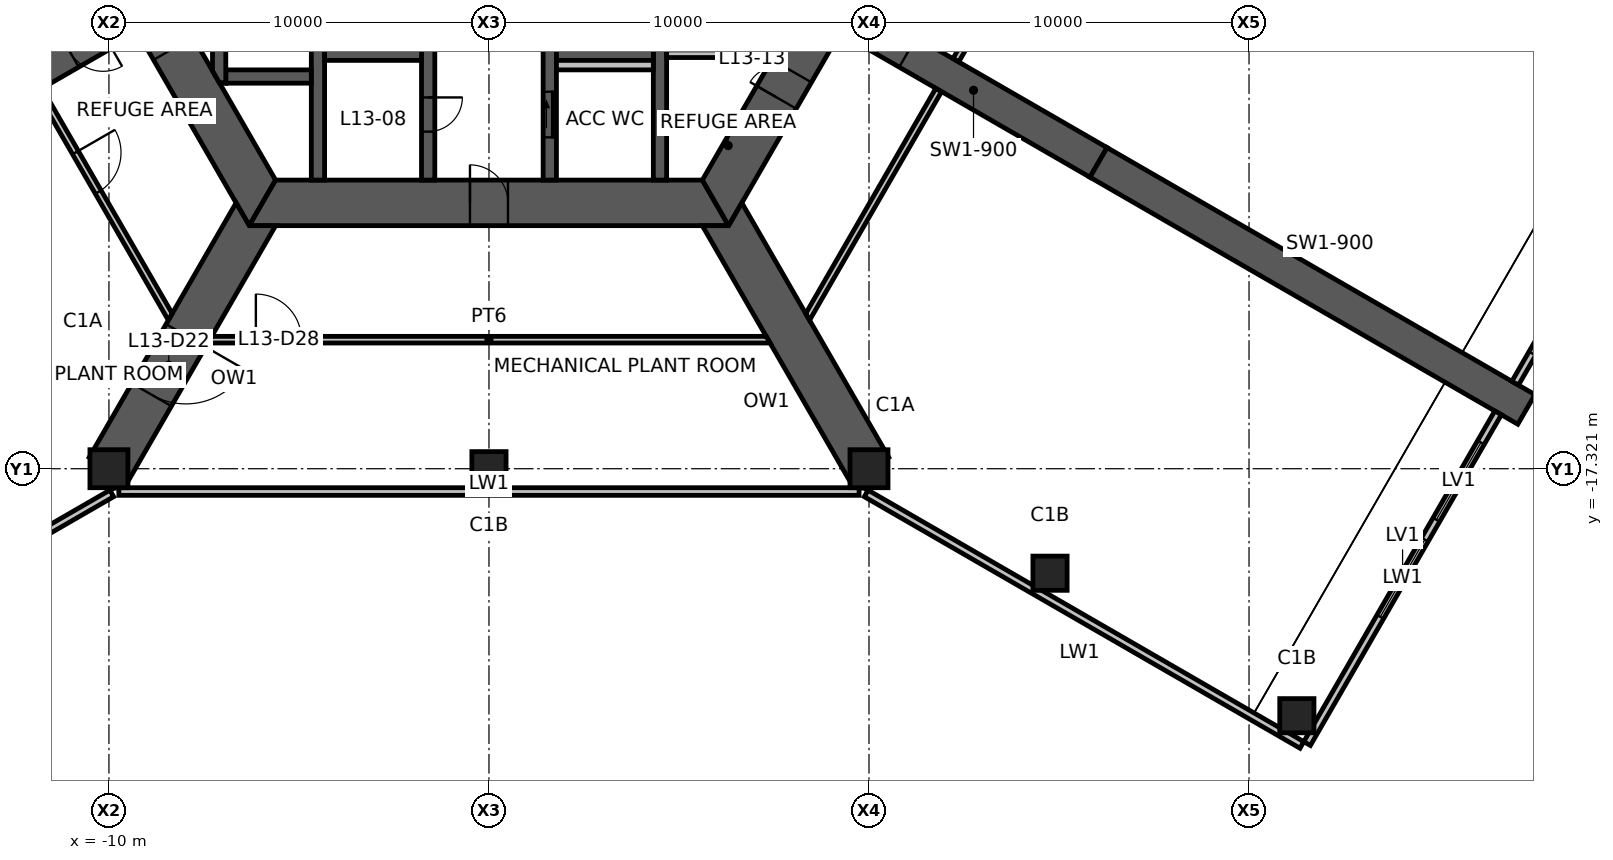
"""IFC4 building model, lengths in metres.
Left out: names, types, materials, properties, quantities, classifications, styles, units other than length and angle.
Written with IfcOpenShell. Run it as: python <this file> out.ifc"""

import sys

from ifc_helpers import new_model, si_unit, direction, frame, frame_2d, origin, origin_2d, place, context, subcontext, project, spatial, polyline, rectangle, hollow_rectangle, outline, extrude, element, fill, save


model = new_model("IFC4")
c1 = context("Model", 3, precision=1e-05, world=origin(), true_north=direction((0.0, 1.0)))
c2 = subcontext(c1, "Body", "Model", "MODEL_VIEW")
j1 = project(units=[si_unit("LENGTHUNIT", "METRE"), si_unit("PLANEANGLEUNIT", "RADIAN")], contexts=[c1])
p1 = place(None, origin())
s1 = spatial("IfcSite", under=j1, at=p1, CompositionType="ELEMENT")
p2 = place(p1, origin())
s2 = spatial("IfcBuilding", under=s1, at=p2, CompositionType="ELEMENT")
p3 = place(p2, frame((0.0, 0.0, 52.0)))
s3 = spatial("IfcBuildingStorey", under=s2, at=p3, CompositionType="ELEMENT", Elevation=52.0)
for number, where, z_axis, x_axis in (
    (1, (-10.0, -17.321, 0.0), (0.0, 0.0, 1.0), (1.0, 0.0, 0.0)),
    (2, (10.0, -17.321, 0.0), (0.0, 0.0, 1.0), (1.0, 0.0, 0.0)),
):
    element("IfcColumn", number, at=place(p3, frame(where, z_axis=z_axis, x_axis=x_axis)), inside=s3, PredefinedType="COLUMN", context=c2, shape_type="SweptSolid", body=[
        extrude(hollow_rectangle(XDim=1.0, YDim=1.0, WallThickness=0.06, at=origin_2d()), origin(), (0.0, 0.0, 1.0), 5.0),
    ])
for number, where, z_axis, x_axis in (
    (3, (0.0, -17.321, 0.0), (0.0, 0.0, 1.0), (1.0, 0.0, 0.0)),
    (4, (14.763, -20.071, 0.0), (0.0, 0.0, 1.0), (1.0, 0.0, 0.0)),
    (5, (21.258, -23.821, 0.0), (0.0, 0.0, 1.0), (1.0, 0.0, 0.0)),
):
    element("IfcColumn", number, at=place(p3, frame(where, z_axis=z_axis, x_axis=x_axis)), inside=s3, PredefinedType="COLUMN", context=c2, shape_type="SweptSolid", body=[
        extrude(hollow_rectangle(XDim=0.9, YDim=0.9, WallThickness=0.05, at=origin_2d()), origin(), (0.0, 0.0, 1.0), 5.0),
    ])
p4 = place(p3, frame((-11.922, 0.0, 0.0), z_axis=(0.0, 0.0, 1.0), x_axis=(0.500004296715, -0.866022923061, 0.0)))
e6 = element("IfcWall", 6, at=p4, inside=s3, PredefinedType="SHEAR", context=c2, shape_type="SweptSolid", body=[
    extrude(outline(polyline([(-0.346, -0.6), (6.431, -0.6), (7.231, -0.6), (12.269, -0.6), (11.576, 0.6), (7.231, 0.6), (6.431, 0.6), (0.346, 0.6), (-0.346, -0.6)])), origin(), (0.0, 0.0, 1.0), 5.0),
])
p5 = place(p4, frame((6.431, 0.0, 0.0)))
e7 = element("IfcOpeningElement", 7, at=p5, cuts=e6, PredefinedType="OPENING", context=c2, shape_type="SweptSolid", body=[
    extrude(rectangle(XDim=0.8, YDim=2.1, at=frame_2d((0.4, 1.05))), frame((0.0, 0.61, 0.0), z_axis=(0.0, -1.0, 0.0), x_axis=(1.0, 0.0, 0.0)), (0.0, 0.0, 1.0), 1.22),
])
p6 = place(p3, frame((-5.961, -10.325, 0.0), z_axis=(0.0, 0.0, 1.0), x_axis=(1.0, 0.0, 0.0)))
e8 = element("IfcWall", 8, at=p6, inside=s3, PredefinedType="SHEAR", context=c2, shape_type="SweptSolid", body=[
    extrude(outline(polyline([(-0.346, -0.6), (5.461, -0.6), (6.461, -0.6), (12.269, -0.6), (11.576, 0.6), (6.461, 0.6), (5.461, 0.6), (0.346, 0.6), (-0.346, -0.6)])), origin(), (0.0, 0.0, 1.0), 5.0),
])
p7 = place(p6, frame((5.461, 0.0, 0.0)))
e9 = element("IfcOpeningElement", 9, at=p7, cuts=e8, PredefinedType="OPENING", context=c2, shape_type="SweptSolid", body=[
    extrude(rectangle(XDim=1.0, YDim=2.1, at=frame_2d((0.5, 1.05))), frame((0.0, 0.61, 0.0), z_axis=(0.0, -1.0, 0.0), x_axis=(1.0, 0.0, 0.0)), (0.0, 0.0, 1.0), 1.22),
])
p8 = place(p3, frame((5.961, -10.325, 0.0), z_axis=(0.0, 0.0, 1.0), x_axis=(0.500004296715, 0.866022923061, 0.0)))
e10 = element("IfcWall", 10, at=p8, inside=s3, PredefinedType="SHEAR", context=c2, shape_type="SweptSolid", body=[
    extrude(outline(polyline([(-0.346, -0.6), (3.208, -0.6), (4.009, -0.6), (12.269, -0.6), (11.576, 0.6), (4.009, 0.6), (3.208, 0.6), (0.346, 0.6), (-0.346, -0.6)])), origin(), (0.0, 0.0, 1.0), 5.0),
])
p9 = place(p8, frame((3.208, 0.0, 0.0)))
e11 = element("IfcOpeningElement", 11, at=p9, cuts=e10, PredefinedType="OPENING", context=c2, shape_type="SweptSolid", body=[
    extrude(rectangle(XDim=0.8, YDim=2.1, at=frame_2d((0.4, 1.05))), frame((0.0, 0.61, 0.0), z_axis=(0.0, -1.0, 0.0), x_axis=(1.0, 0.0, 0.0)), (0.0, 0.0, 1.0), 1.22),
])
p10 = place(p3, frame((-9.461, -5.462, 0.0), z_axis=(0.0, 0.0, 1.0), x_axis=(-0.866019116917, -0.500010889016, 0.0)))
e12 = element("IfcWall", 12, at=p10, inside=s3, PredefinedType="SHEAR", context=c2, shape_type="SweptSolid", body=[
    extrude(rectangle(XDim=7.595, YDim=0.9, at=frame_2d((3.798, 0.0))), origin(), (0.0, 0.0, 1.0), 5.0),
])
p11 = place(p10, frame((0.8, 0.0, 0.0)))
e13 = element("IfcOpeningElement", 13, at=p11, cuts=e12, PredefinedType="OPENING", context=c2, shape_type="SweptSolid", body=[
    extrude(rectangle(XDim=1.0, YDim=2.1, at=frame_2d((0.5, 1.05))), frame((0.0, 0.46, 0.0), z_axis=(0.0, -1.0, 0.0), x_axis=(1.0, 0.0, 0.0)), (0.0, 0.0, 1.0), 0.92),
])
p12 = place(p3, frame((9.461, -5.462, 0.0), z_axis=(0.0, 0.0, 1.0), x_axis=(0.866019116917, -0.500010889016, 0.0)))
e14 = element("IfcWall", 14, at=p12, inside=s3, PredefinedType="SHEAR", context=c2, shape_type="SweptSolid", body=[
    extrude(rectangle(XDim=7.595, YDim=0.9, at=frame_2d((3.798, 0.0))), origin(), (0.0, 0.0, 1.0), 5.0),
])
p13 = place(p12, frame((0.8, 0.0, 0.0)))
e15 = element("IfcOpeningElement", 15, at=p13, cuts=e14, PredefinedType="OPENING", context=c2, shape_type="SweptSolid", body=[
    extrude(rectangle(XDim=1.0, YDim=2.1, at=frame_2d((0.5, 1.05))), frame((0.0, 0.46, 0.0), z_axis=(0.0, -1.0, 0.0), x_axis=(1.0, 0.0, 0.0)), (0.0, 0.0, 1.0), 0.92),
])
p14 = place(p3, frame((16.039, -9.26, 0.0), z_axis=(0.0, 0.0, 1.0), x_axis=(0.866024837091, -0.50000098154, 0.0)))
e16 = element("IfcWall", 16, at=p14, inside=s3, PredefinedType="SHEAR", context=c2, shape_type="SweptSolid", body=[
    extrude(rectangle(XDim=13.0, YDim=0.9, at=frame_2d((6.5, 0.0))), origin(), (0.0, 0.0, 1.0), 5.0),
])
p15 = place(p3, frame((-6.308, -10.925, -1.15), z_axis=(0.0, 0.0, 1.0), x_axis=(-0.499993363642, -0.866029235253, 0.0)))
e17 = element("IfcWall", 17, at=p15, inside=s3, PredefinedType="SHEAR", context=c2, shape_type="SweptSolid", body=[
    extrude(outline(polyline([(-0.346, -0.6), (3.338, -0.6), (5.138, -0.6), (7.385, -0.6), (7.385, 0.6), (5.138, 0.6), (3.338, 0.6), (-0.346, 0.6), (0.0, 0.0), (-0.346, -0.6)])), origin(), (0.0, 0.0, 1.0), 6.15),
])
p16 = place(p15, frame((3.338, 0.0, 1.15)))
e18 = element("IfcOpeningElement", 18, at=p16, cuts=e17, PredefinedType="OPENING", context=c2, shape_type="SweptSolid", body=[
    extrude(rectangle(XDim=1.8, YDim=2.4, at=frame_2d((0.9, 1.2))), frame((0.0, 0.61, 0.0), z_axis=(0.0, -1.0, 0.0), x_axis=(1.0, 0.0, 0.0)), (0.0, 0.0, 1.0), 1.22),
])
p17 = place(p3, frame((6.308, -10.925, -1.15), z_axis=(0.0, 0.0, 1.0), x_axis=(0.499993363642, -0.866029235253, 0.0)))
e19 = element("IfcWall", 19, at=p17, inside=s3, PredefinedType="SHEAR", context=c2, shape_type="SweptSolid", body=[
    extrude(outline(polyline([(-0.346, -0.6), (7.385, -0.6), (7.385, 0.6), (-0.346, 0.6), (0.0, 0.0), (-0.346, -0.6)])), origin(), (0.0, 0.0, 1.0), 6.15),
])
p18 = place(p3, frame((-21.391, -24.59, 0.0), z_axis=(0.0, 0.0, 1.0), x_axis=(0.86602620781, 0.499998607384, 0.0)))
e20 = element("IfcWall", 20, at=p18, inside=s3, PredefinedType="ELEMENTEDWALL", context=c2, shape_type="SweptSolid", body=[
    extrude(rectangle(XDim=13.239, YDim=0.2, at=frame_2d((6.62, 0.0))), origin(), (0.0, 0.0, 1.0), 5.0),
])
p19 = place(p3, frame((-9.739, -17.92, 0.0), z_axis=(0.0, 0.0, 1.0), x_axis=(1.0, 0.0, 0.0)))
e21 = element("IfcWall", 21, at=p19, inside=s3, PredefinedType="ELEMENTEDWALL", context=c2, shape_type="SweptSolid", body=[
    extrude(rectangle(XDim=19.479, YDim=0.2, at=frame_2d((9.739, 0.0))), origin(), (0.0, 0.0, 1.0), 5.0),
])
p20 = place(p3, frame((9.926, -17.97, 0.0), z_axis=(0.0, 0.0, 1.0), x_axis=(0.86602620781, -0.499998607384, 0.0)))
e22 = element("IfcWall", 22, at=p20, inside=s3, PredefinedType="ELEMENTEDWALL", context=c2, shape_type="SweptSolid", body=[
    extrude(rectangle(XDim=13.239, YDim=0.2, at=frame_2d((6.62, 0.0))), origin(), (0.0, 0.0, 1.0), 5.0),
])
p21 = place(p3, frame((21.528, -24.553, 0.0), z_axis=(0.0, 0.0, 1.0), x_axis=(0.500008433718, 0.866020534521, 0.0)))
e23 = element("IfcWall", 23, at=p21, inside=s3, PredefinedType="ELEMENTEDWALL", context=c2, shape_type="SweptSolid", body=[
    extrude(rectangle(XDim=10.05, YDim=0.2, at=frame_2d((5.025, 0.0))), origin(), (0.0, 0.0, 1.0), 5.0),
])
p22 = place(p21, frame((3.85, 0.0, 0.6)))
e24 = element("IfcOpeningElement", 24, at=p22, cuts=e23, PredefinedType="OPENING", context=c2, shape_type="SweptSolid", body=[
    extrude(rectangle(XDim=2.35, YDim=3.6, at=frame_2d((1.175, 1.8))), frame((0.0, 0.11, 0.0), z_axis=(0.0, -1.0, 0.0), x_axis=(1.0, 0.0, 0.0)), (0.0, 0.0, 1.0), 0.22),
])
p23 = place(p21, frame((6.8, 0.0, 0.6)))
e25 = element("IfcOpeningElement", 25, at=p23, cuts=e23, PredefinedType="OPENING", context=c2, shape_type="SweptSolid", body=[
    extrude(rectangle(XDim=2.35, YDim=3.6, at=frame_2d((1.175, 1.8))), frame((0.0, 0.11, 0.0), z_axis=(0.0, -1.0, 0.0), x_axis=(1.0, 0.0, 0.0)), (0.0, 0.0, 1.0), 0.22),
])
p24 = place(p3, frame((27.003, -15.071, 0.0), z_axis=(0.0, 0.0, 1.0), x_axis=(0.499990214365, 0.86603105345, 0.0)))
e26 = element("IfcWall", 26, at=p24, inside=s3, PredefinedType="ELEMENTEDWALL", context=c2, shape_type="SweptSolid", body=[
    extrude(rectangle(XDim=10.05, YDim=0.2, at=frame_2d((5.025, 0.0))), origin(), (0.0, 0.0, 1.0), 5.0),
])
p25 = place(p24, frame((0.9, 0.0, 0.6)))
e27 = element("IfcOpeningElement", 27, at=p25, cuts=e26, PredefinedType="OPENING", context=c2, shape_type="SweptSolid", body=[
    extrude(rectangle(XDim=2.35, YDim=3.6, at=frame_2d((1.175, 1.8))), frame((0.0, 0.11, 0.0), z_axis=(0.0, -1.0, 0.0), x_axis=(1.0, 0.0, 0.0)), (0.0, 0.0, 1.0), 0.22),
])
p26 = place(p24, frame((3.85, 0.0, 0.6)))
e28 = element("IfcOpeningElement", 28, at=p26, cuts=e26, PredefinedType="OPENING", context=c2, shape_type="SweptSolid", body=[
    extrude(rectangle(XDim=2.35, YDim=3.6, at=frame_2d((1.175, 1.8))), frame((0.0, 0.11, 0.0), z_axis=(0.0, -1.0, 0.0), x_axis=(1.0, 0.0, 0.0)), (0.0, 0.0, 1.0), 0.22),
])
p27 = place(p3, frame((-1.6, -3.775, 0.0), z_axis=(0.0, 0.0, 1.0), x_axis=(0.0, -1.0, 0.0)))
e29 = element("IfcWall", 29, at=p27, inside=s3, PredefinedType="SHEAR", context=c2, shape_type="SweptSolid", body=[
    extrude(rectangle(XDim=5.95, YDim=0.35, at=frame_2d((2.975, 0.0))), origin(), (0.0, 0.0, 1.0), 5.0),
])
p28 = place(p27, frame((3.775, 0.0, 0.0)))
e30 = element("IfcOpeningElement", 30, at=p28, cuts=e29, PredefinedType="OPENING", context=c2, shape_type="SweptSolid", body=[
    extrude(rectangle(XDim=0.9, YDim=2.1, at=frame_2d((0.45, 1.05))), frame((0.0, 0.185, 0.0), z_axis=(0.0, -1.0, 0.0), x_axis=(1.0, 0.0, 0.0)), (0.0, 0.0, 1.0), 0.37),
])
p29 = place(p3, frame((1.6, -3.775, 0.0), z_axis=(0.0, 0.0, 1.0), x_axis=(0.0, -1.0, 0.0)))
e31 = element("IfcWall", 31, at=p29, inside=s3, PredefinedType="SHEAR", context=c2, shape_type="SweptSolid", body=[
    extrude(rectangle(XDim=5.95, YDim=0.35, at=frame_2d((2.975, 0.0))), origin(), (0.0, 0.0, 1.0), 5.0),
])
p30 = place(p29, frame((3.625, 0.0, 0.0)))
e32 = element("IfcOpeningElement", 32, at=p30, cuts=e31, PredefinedType="OPENING", context=c2, shape_type="SweptSolid", body=[
    extrude(rectangle(XDim=1.2, YDim=2.1, at=frame_2d((0.6, 1.05))), frame((0.0, 0.185, 0.0), z_axis=(0.0, -1.0, 0.0), x_axis=(1.0, 0.0, 0.0)), (0.0, 0.0, 1.0), 0.37),
])
for number, where, z_axis, x_axis in (
    (33, (-4.5, -3.775, 0.0), (0.0, 0.0, 1.0), (0.0, -1.0, 0.0)),
    (34, (4.5, -3.775, 0.0), (0.0, 0.0, 1.0), (0.0, -1.0, 0.0)),
):
    element("IfcWall", number, at=place(p3, frame(where, z_axis=z_axis, x_axis=x_axis)), inside=s3, PredefinedType="SHEAR", context=c2, shape_type="SweptSolid", body=[
        extrude(rectangle(XDim=5.95, YDim=0.35, at=frame_2d((2.975, 0.0))), origin(), (0.0, 0.0, 1.0), 5.0),
    ])
for number, where, z_axis, x_axis in (
    (35, (-4.325, -6.4, 0.0), (0.0, 0.0, 1.0), (1.0, 0.0, 0.0)),
    (36, (1.775, -6.4, 0.0), (0.0, 0.0, 1.0), (1.0, 0.0, 0.0)),
):
    element("IfcWall", number, at=place(p3, frame(where, z_axis=z_axis, x_axis=x_axis)), inside=s3, PredefinedType="SHEAR", context=c2, shape_type="SweptSolid", body=[
        extrude(rectangle(XDim=2.55, YDim=0.35, at=frame_2d((1.275, 0.0))), origin(), (0.0, 0.0, 1.0), 5.0),
    ])
p31 = place(p3, frame((-6.925, -7.0, 0.0), z_axis=(0.0, 0.0, 1.0), x_axis=(1.0, 0.0, 0.0)))
e37 = element("IfcWall", 37, at=p31, inside=s3, PredefinedType="SHEAR", context=c2, shape_type="SweptSolid", body=[
    extrude(rectangle(XDim=2.25, YDim=0.35, at=frame_2d((1.125, 0.0))), origin(), (0.0, 0.0, 1.0), 5.0),
])
p32 = place(p3, frame((-7.1, -3.775, 0.0), z_axis=(0.0, 0.0, 1.0), x_axis=(0.0, -1.0, 0.0)))
e38 = element("IfcWall", 38, at=p32, inside=s3, PredefinedType="SHEAR", context=c2, shape_type="SweptSolid", body=[
    extrude(outline(polyline([(0.0, -0.175), (3.074, -0.175), (3.377, 0.0), (3.4, 0.175), (0.0, 0.175), (0.0, -0.175)])), origin(), (0.0, 0.0, 1.0), 5.0),
])
p33 = place(p3, frame((4.675, -6.4, 0.0), z_axis=(0.0, 0.0, 1.0), x_axis=(1.0, 0.0, 0.0)))
e39 = element("IfcWall", 39, at=p33, inside=s3, PredefinedType="STANDARD", context=c2, shape_type="SweptSolid", body=[
    extrude(rectangle(XDim=2.425, YDim=0.2, at=frame_2d((1.212, 0.0))), origin(), (0.0, 0.0, 1.0), 5.0),
])
p34 = place(p3, frame((1.775, -6.7, 0.0), z_axis=(0.0, 0.0, 1.0), x_axis=(1.0, 0.0, 0.0)))
e40 = element("IfcWall", 40, at=p34, inside=s3, PredefinedType="PLUMBINGWALL", context=c2, shape_type="SweptSolid", body=[
    extrude(rectangle(XDim=2.55, YDim=0.25, at=frame_2d((1.275, 0.0))), origin(), (0.0, 0.0, 1.0), 5.0),
])
p35 = place(p3, frame((-11.832, -7.356, 0.0), z_axis=(0.0, 0.0, 1.0), x_axis=(0.49998719302, -0.866032797772, 0.0)))
e41 = element("IfcWall", 41, at=p35, inside=s3, PredefinedType="PARTITIONING", context=c2, shape_type="SweptSolid", body=[
    extrude(outline(polyline([(0.0, -0.087), (1.9, -0.087), (3.1, -0.087), (6.942, -0.087), (6.841, 0.087), (3.1, 0.087), (1.9, 0.087), (0.0, 0.087), (0.0, -0.087)])), origin(), (0.0, 0.0, 1.0), 4.83),
])
p36 = place(p35, frame((1.9, 0.0, 0.0)))
e42 = element("IfcOpeningElement", 42, at=p36, cuts=e41, PredefinedType="OPENING", context=c2, shape_type="SweptSolid", body=[
    extrude(rectangle(XDim=1.2, YDim=2.1, at=frame_2d((0.6, 1.05))), frame((0.0, 0.098, 0.0), z_axis=(0.0, -1.0, 0.0), x_axis=(1.0, 0.0, 0.0)), (0.0, 0.0, 1.0), 0.195),
])
p37 = place(p3, frame((12.287, -6.569, 0.0), z_axis=(0.0, 0.0, 1.0), x_axis=(0.49998719302, 0.866032797772, 0.0)))
e43 = element("IfcWall", 43, at=p37, inside=s3, PredefinedType="PARTITIONING", context=c2, shape_type="SweptSolid", body=[
    extrude(outline(polyline([(0.0, -0.087), (1.9, -0.087), (3.1, -0.087), (6.942, -0.087), (6.841, 0.087), (3.1, 0.087), (1.9, 0.087), (0.0, 0.087), (0.0, -0.087)])), origin(), (0.0, 0.0, 1.0), 4.83),
])
p38 = place(p37, frame((1.9, 0.0, 0.0)))
e44 = element("IfcOpeningElement", 44, at=p38, cuts=e43, PredefinedType="OPENING", context=c2, shape_type="SweptSolid", body=[
    extrude(rectangle(XDim=1.2, YDim=2.1, at=frame_2d((0.6, 1.05))), frame((0.0, 0.098, 0.0), z_axis=(0.0, -1.0, 0.0), x_axis=(1.0, 0.0, 0.0)), (0.0, 0.0, 1.0), 0.195),
])
p39 = place(p3, frame((-7.347, -13.925, 0.0), z_axis=(0.0, 0.0, 1.0), x_axis=(1.0, 0.0, 0.0)))
e45 = element("IfcWall", 45, at=p39, inside=s3, PredefinedType="PARTITIONING", context=c2, shape_type="SweptSolid", body=[
    extrude(outline(polyline([(-0.051, -0.087), (1.213, -0.087), (2.413, -0.087), (14.744, -0.087), (14.643, 0.087), (2.413, 0.087), (1.213, 0.087), (0.051, 0.087), (-0.051, -0.087)])), origin(), (0.0, 0.0, 1.0), 4.83),
])
p40 = place(p39, frame((1.213, 0.0, 0.0)))
e46 = element("IfcOpeningElement", 46, at=p40, cuts=e45, PredefinedType="OPENING", context=c2, shape_type="SweptSolid", body=[
    extrude(rectangle(XDim=1.2, YDim=2.1, at=frame_2d((0.6, 1.05))), frame((0.0, 0.098, 0.0), z_axis=(0.0, -1.0, 0.0), x_axis=(1.0, 0.0, 0.0)), (0.0, 0.0, 1.0), 0.195),
])
p41 = place(p3, frame((8.386, -13.325, 0.0), z_axis=(0.0, 0.0, 1.0), x_axis=(0.49998719302, 0.866032797772, 0.0)))
e47 = element("IfcWall", 47, at=p41, inside=s3, PredefinedType="PARTITIONING", context=c2, shape_type="SweptSolid", body=[
    extrude(outline(polyline([(-0.051, -0.087), (6.892, -0.087), (6.892, 0.087), (0.051, 0.087), (-0.051, -0.087)])), origin(), (0.0, 0.0, 1.0), 4.83),
])
p42 = place(p22, origin())
e48 = element("IfcWindow", 48, at=p42, inside=s3, PartitioningType="SINGLE_PANEL", PredefinedType="USERDEFINED", context=c2, shape_type="SweptSolid", body=[
    extrude(rectangle(XDim=2.35, YDim=3.6, at=frame_2d((1.175, 1.8))), frame((0.0, 0.03, 0.0), z_axis=(0.0, -1.0, 0.0), x_axis=(1.0, 0.0, 0.0)), (0.0, 0.0, 1.0), 0.06),
])
fill(e24, e48)
p43 = place(p23, origin())
e49 = element("IfcWindow", 49, at=p43, inside=s3, PartitioningType="SINGLE_PANEL", PredefinedType="USERDEFINED", context=c2, shape_type="SweptSolid", body=[
    extrude(rectangle(XDim=2.35, YDim=3.6, at=frame_2d((1.175, 1.8))), frame((0.0, 0.03, 0.0), z_axis=(0.0, -1.0, 0.0), x_axis=(1.0, 0.0, 0.0)), (0.0, 0.0, 1.0), 0.06),
])
fill(e25, e49)
p44 = place(p25, origin())
e50 = element("IfcWindow", 50, at=p44, inside=s3, PartitioningType="SINGLE_PANEL", PredefinedType="USERDEFINED", context=c2, shape_type="SweptSolid", body=[
    extrude(rectangle(XDim=2.35, YDim=3.6, at=frame_2d((1.175, 1.8))), frame((0.0, 0.03, 0.0), z_axis=(0.0, -1.0, 0.0), x_axis=(1.0, 0.0, 0.0)), (0.0, 0.0, 1.0), 0.06),
])
fill(e27, e50)
p45 = place(p7, origin())
e51 = element("IfcDoor", 51, at=p45, inside=s3, OperationType="SINGLE_SWING_LEFT", PredefinedType="DOOR", context=c2, shape_type="SweptSolid", body=[
    extrude(rectangle(XDim=1.0, YDim=2.1, at=frame_2d((0.5, 1.05))), frame((0.0, 0.025, 0.0), z_axis=(0.0, -1.0, 0.0), x_axis=(1.0, 0.0, 0.0)), (0.0, 0.0, 1.0), 0.05),
])
fill(e9, e51)
p46 = place(p9, origin())
e52 = element("IfcDoor", 52, at=p46, inside=s3, OperationType="SINGLE_SWING_LEFT", PredefinedType="DOOR", context=c2, shape_type="SweptSolid", body=[
    extrude(rectangle(XDim=0.8, YDim=2.1, at=frame_2d((0.4, 1.05))), frame((0.0, 0.025, 0.0), z_axis=(0.0, -1.0, 0.0), x_axis=(1.0, 0.0, 0.0)), (0.0, 0.0, 1.0), 0.05),
])
fill(e11, e52)
p47 = place(p30, origin())
e53 = element("IfcDoor", 53, at=p47, inside=s3, OperationType="SLIDING_TO_LEFT", PredefinedType="DOOR", context=c2, shape_type="SweptSolid", body=[
    extrude(rectangle(XDim=1.2, YDim=2.1, at=frame_2d((0.6, 1.05))), frame((0.0, 0.025, 0.0), z_axis=(0.0, -1.0, 0.0), x_axis=(1.0, 0.0, 0.0)), (0.0, 0.0, 1.0), 0.05),
])
fill(e32, e53)
p48 = place(p28, origin())
e54 = element("IfcDoor", 54, at=p48, inside=s3, OperationType="SINGLE_SWING_LEFT", PredefinedType="DOOR", context=c2, shape_type="SweptSolid", body=[
    extrude(rectangle(XDim=0.9, YDim=2.1, at=frame_2d((0.45, 1.05))), frame((0.0, 0.025, 0.0), z_axis=(0.0, -1.0, 0.0), x_axis=(1.0, 0.0, 0.0)), (0.0, 0.0, 1.0), 0.05),
])
fill(e30, e54)
p49 = place(p11, origin())
e55 = element("IfcDoor", 55, at=p49, inside=s3, OperationType="SINGLE_SWING_LEFT", PredefinedType="DOOR", context=c2, shape_type="SweptSolid", body=[
    extrude(rectangle(XDim=1.0, YDim=2.1, at=frame_2d((0.5, 1.05))), frame((0.0, 0.025, 0.0), z_axis=(0.0, -1.0, 0.0), x_axis=(1.0, 0.0, 0.0)), (0.0, 0.0, 1.0), 0.05),
])
fill(e13, e55)
p50 = place(p13, origin())
e56 = element("IfcDoor", 56, at=p50, inside=s3, OperationType="SINGLE_SWING_LEFT", PredefinedType="DOOR", context=c2, shape_type="SweptSolid", body=[
    extrude(rectangle(XDim=1.0, YDim=2.1, at=frame_2d((0.5, 1.05))), frame((0.0, 0.025, 0.0), z_axis=(0.0, -1.0, 0.0), x_axis=(1.0, 0.0, 0.0)), (0.0, 0.0, 1.0), 0.05),
])
fill(e15, e56)
p51 = place(p16, origin())
e57 = element("IfcDoor", 57, at=p51, inside=s3, OperationType="DOUBLE_DOOR_SINGLE_SWING", PredefinedType="DOOR", context=c2, shape_type="SweptSolid", body=[
    extrude(rectangle(XDim=1.8, YDim=2.4, at=frame_2d((0.9, 1.2))), frame((0.0, 0.025, 0.0), z_axis=(0.0, -1.0, 0.0), x_axis=(1.0, 0.0, 0.0)), (0.0, 0.0, 1.0), 0.05),
])
fill(e18, e57)
p52 = place(p36, origin())
e58 = element("IfcDoor", 58, at=p52, inside=s3, OperationType="DOUBLE_DOOR_SINGLE_SWING", PredefinedType="DOOR", context=c2, shape_type="SweptSolid", body=[
    extrude(rectangle(XDim=1.2, YDim=2.1, at=frame_2d((0.6, 1.05))), frame((0.0, 0.025, 0.0), z_axis=(0.0, -1.0, 0.0), x_axis=(1.0, 0.0, 0.0)), (0.0, 0.0, 1.0), 0.05),
])
fill(e42, e58)
p53 = place(p40, origin())
e59 = element("IfcDoor", 59, at=p53, inside=s3, OperationType="DOUBLE_DOOR_SINGLE_SWING", PredefinedType="DOOR", context=c2, shape_type="SweptSolid", body=[
    extrude(rectangle(XDim=1.2, YDim=2.1, at=frame_2d((0.6, 1.05))), frame((0.0, 0.025, 0.0), z_axis=(0.0, -1.0, 0.0), x_axis=(1.0, 0.0, 0.0)), (0.0, 0.0, 1.0), 0.05),
])
fill(e46, e59)
save(model, sys.argv[1])
